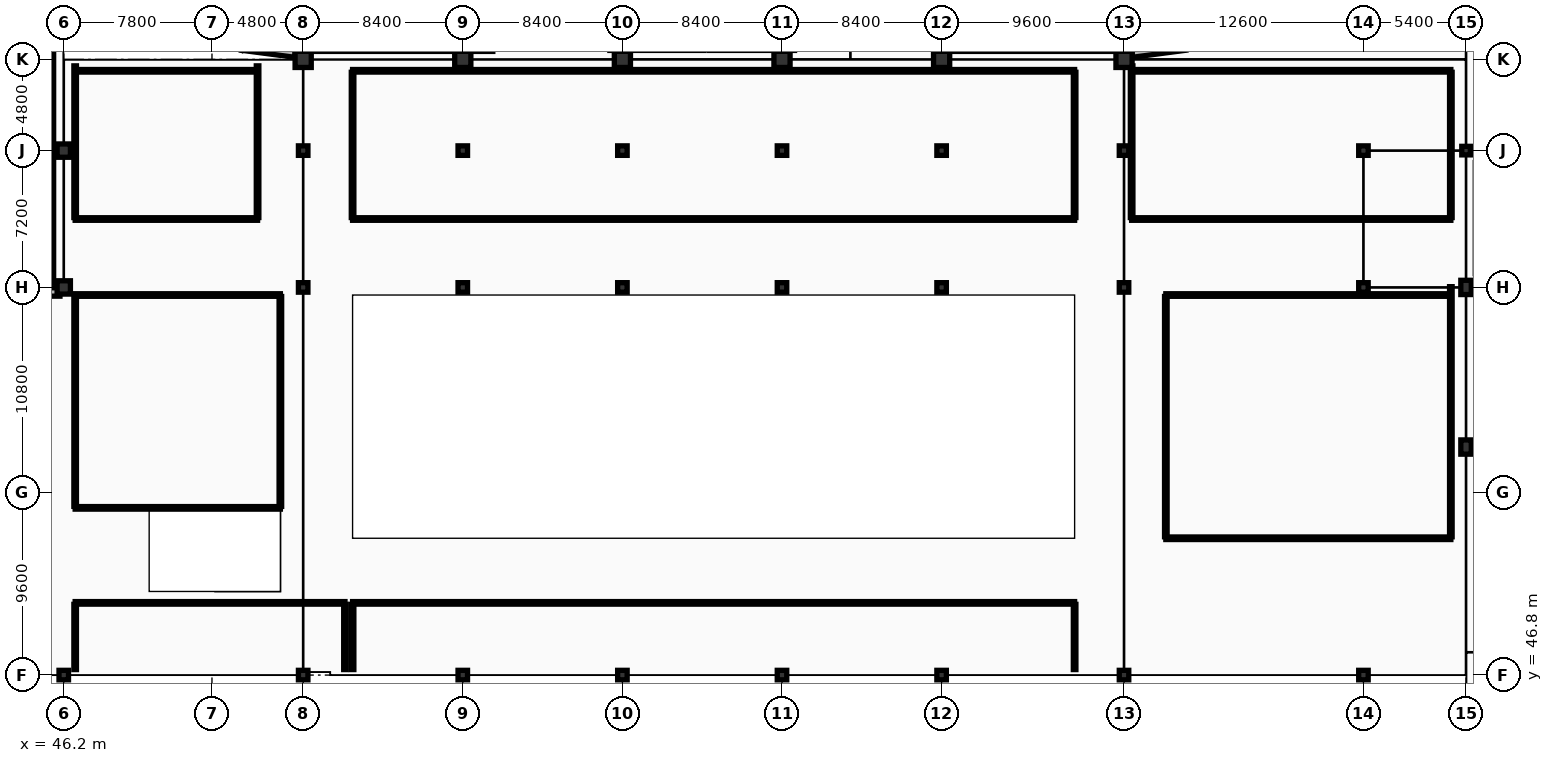
"""IFC4 building model, lengths in metres.
Left out: names, types, materials, properties, quantities, classifications, styles, units other than length and angle.
Written with IfcOpenShell. Run it as: python <this file> out.ifc"""

import sys

from ifc_helpers import new_model, si_unit, direction, frame, frame_2d, origin, origin_2d, place, context, subcontext, project, spatial, rectangle, extrude, element, fill, save


model = new_model("IFC4")
c1 = context("Model", 3, precision=1e-05, world=origin(), true_north=direction((0.0, 1.0)))
c2 = subcontext(c1, "Body", "Model", "MODEL_VIEW")
j1 = project(units=[si_unit("LENGTHUNIT", "METRE"), si_unit("PLANEANGLEUNIT", "RADIAN")], contexts=[c1])
p1 = place(None, origin())
s1 = spatial("IfcSite", under=j1, at=p1, CompositionType="ELEMENT")
p2 = place(p1, origin())
s2 = spatial("IfcBuilding", under=s1, at=p2, CompositionType="ELEMENT")
p3 = place(p2, frame((0.0, 0.0, 5.4)))
s3 = spatial("IfcBuildingStorey", under=s2, at=p3, CompositionType="ELEMENT", Elevation=5.4)
for number, where, z_axis, x_axis in (
    (1, (58.8, 79.2, 0.0), (0.0, 0.0, 1.0), (1.0, 0.0, 0.0)),
    (2, (67.2, 79.2, 0.0), (0.0, 0.0, 1.0), (1.0, 0.0, 0.0)),
    (3, (75.6, 79.2, 0.0), (0.0, 0.0, 1.0), (1.0, 0.0, 0.0)),
    (4, (84.0, 79.2, 0.0), (0.0, 0.0, 1.0), (1.0, 0.0, 0.0)),
    (5, (92.4, 79.2, 0.0), (0.0, 0.0, 1.0), (1.0, 0.0, 0.0)),
    (6, (102.0, 79.2, 0.0), (0.0, 0.0, 1.0), (1.0, 0.0, 0.0)),
):
    element("IfcColumn", number, at=place(p3, frame(where, z_axis=z_axis, x_axis=x_axis)), inside=s3, PredefinedType="COLUMN", context=c2, shape_type="SweptSolid", body=[
        extrude(rectangle(XDim=0.85, YDim=0.85, at=origin_2d()), origin(), (0.0, 0.0, 1.0), 4.5),
    ])
for number, where, z_axis, x_axis in (
    (7, (46.2, 67.2, 0.0), (0.0, 0.0, 1.0), (1.0, 0.0, 0.0)),
    (8, (46.2, 74.4, 0.0), (0.0, 0.0, 1.0), (1.0, 0.0, 0.0)),
):
    element("IfcColumn", number, at=place(p3, frame(where, z_axis=z_axis, x_axis=x_axis)), inside=s3, PredefinedType="COLUMN", context=c2, shape_type="SweptSolid", body=[
        extrude(rectangle(XDim=0.7, YDim=0.7, at=origin_2d()), origin(), (0.0, 0.0, 1.0), 4.5),
    ])
for number, where, z_axis, x_axis in (
    (9, (120.0, 58.8, 0.0), (0.0, 0.0, 1.0), (1.0, 0.0, 0.0)),
    (10, (120.0, 67.2, 0.0), (0.0, 0.0, 1.0), (1.0, 0.0, 0.0)),
):
    element("IfcColumn", number, at=place(p3, frame(where, z_axis=z_axis, x_axis=x_axis)), inside=s3, PredefinedType="COLUMN", context=c2, shape_type="SweptSolid", body=[
        extrude(rectangle(XDim=0.55, YDim=0.75, at=origin_2d()), origin(), (0.0, 0.0, 1.0), 4.5),
    ])
p4 = place(p3, frame((120.0, 74.4, 0.0), z_axis=(0.0, 0.0, 1.0), x_axis=(1.0, 0.0, 0.0)))
e11 = element("IfcColumn", 11, at=p4, inside=s3, PredefinedType="COLUMN", context=c2, shape_type="SweptSolid", body=[
    extrude(rectangle(XDim=0.45, YDim=0.45, at=origin_2d()), origin(), (0.0, 0.0, 1.0), 4.5),
])
for number, where, z_axis, x_axis in (
    (12, (46.2, 46.8, 0.0), (0.0, 0.0, 1.0), (1.0, 0.0, 0.0)),
    (13, (58.8, 46.8, 0.0), (0.0, 0.0, 1.0), (1.0, 0.0, 0.0)),
    (14, (58.8, 67.2, 0.0), (0.0, 0.0, 1.0), (1.0, 0.0, 0.0)),
    (15, (58.8, 74.4, 0.0), (0.0, 0.0, 1.0), (1.0, 0.0, 0.0)),
    (16, (67.2, 46.8, 0.0), (0.0, 0.0, 1.0), (1.0, 0.0, 0.0)),
    (17, (67.2, 67.2, 0.0), (0.0, 0.0, 1.0), (1.0, 0.0, 0.0)),
    (18, (67.2, 74.4, 0.0), (0.0, 0.0, 1.0), (1.0, 0.0, 0.0)),
    (19, (75.6, 46.8, 0.0), (0.0, 0.0, 1.0), (1.0, 0.0, 0.0)),
    (20, (75.6, 67.2, 0.0), (0.0, 0.0, 1.0), (1.0, 0.0, 0.0)),
    (21, (75.6, 74.4, 0.0), (0.0, 0.0, 1.0), (1.0, 0.0, 0.0)),
    (22, (84.0, 46.8, 0.0), (0.0, 0.0, 1.0), (1.0, 0.0, 0.0)),
    (23, (84.0, 67.2, 0.0), (0.0, 0.0, 1.0), (1.0, 0.0, 0.0)),
    (24, (84.0, 74.4, 0.0), (0.0, 0.0, 1.0), (1.0, 0.0, 0.0)),
    (25, (92.4, 46.8, 0.0), (0.0, 0.0, 1.0), (1.0, 0.0, 0.0)),
    (26, (92.4, 67.2, 0.0), (0.0, 0.0, 1.0), (1.0, 0.0, 0.0)),
    (27, (92.4, 74.4, 0.0), (0.0, 0.0, 1.0), (1.0, 0.0, 0.0)),
    (28, (102.0, 46.8, 0.0), (0.0, 0.0, 1.0), (1.0, 0.0, 0.0)),
    (29, (102.0, 67.2, 0.0), (0.0, 0.0, 1.0), (1.0, 0.0, 0.0)),
    (30, (102.0, 74.4, 0.0), (0.0, 0.0, 1.0), (1.0, 0.0, 0.0)),
    (31, (114.6, 46.8, 0.0), (0.0, 0.0, 1.0), (1.0, 0.0, 0.0)),
    (32, (114.6, 67.2, 0.0), (0.0, 0.0, 1.0), (1.0, 0.0, 0.0)),
    (33, (114.6, 74.4, 0.0), (0.0, 0.0, 1.0), (1.0, 0.0, 0.0)),
):
    element("IfcColumn", number, at=place(p3, frame(where, z_axis=z_axis, x_axis=x_axis)), inside=s3, PredefinedType="COLUMN", context=c2, shape_type="SweptSolid", body=[
        extrude(rectangle(XDim=0.5, YDim=0.5, at=origin_2d()), origin(), (0.0, 0.0, 1.0), 4.5),
    ])
p5 = place(p3, frame((55.572, 79.877, 0.0), z_axis=(0.0, 0.0, 1.0), x_axis=(0.991443994311, -0.130532778046, 0.0)))
e34 = element("IfcWall", 34, at=p5, inside=s3, PredefinedType="ELEMENTEDWALL", context=c2, shape_type="SweptSolid", body=[
    extrude(rectangle(XDim=2.824, YDim=0.395, at=frame_2d((1.412, 0.0))), origin(), (0.0, 0.0, 1.0), 3.37),
])
p6 = place(p3, frame((102.428, 79.509, 0.0), z_axis=(0.0, 0.0, 1.0), x_axis=(0.991443994311, 0.130532778046, 0.0)))
e35 = element("IfcWall", 35, at=p6, inside=s3, PredefinedType="ELEMENTEDWALL", context=c2, shape_type="SweptSolid", body=[
    extrude(rectangle(XDim=2.824, YDim=0.395, at=frame_2d((1.412, 0.0))), origin(), (0.0, 0.0, 1.0), 3.37),
])
p7 = place(p6, frame((0.962, 0.0, 0.85)))
e36 = element("IfcOpeningElement", 36, at=p7, cuts=e35, PredefinedType="OPENING", context=c2, shape_type="SweptSolid", body=[
    extrude(rectangle(XDim=0.9, YDim=1.85, at=frame_2d((0.45, 0.925))), frame((0.0, 0.208, 0.0), z_axis=(0.0, -1.0, 0.0), x_axis=(1.0, 0.0, 0.0)), (0.0, 0.0, 1.0), 0.415),
])
p8 = place(p3, frame((38.45, 66.96, 0.0), z_axis=(0.0, 0.0, 1.0), x_axis=(1.0, 0.0, 0.0)))
e37 = element("IfcWall", 37, at=p8, inside=s3, PredefinedType="STANDARD", context=c2, shape_type="SweptSolid", body=[
    extrude(rectangle(XDim=7.55, YDim=0.44, at=frame_2d((3.775, 0.0))), origin(), (0.0, 0.0, 1.0), 3.23),
])
p9 = place(p3, frame((45.6, 67.8, 0.0), z_axis=(0.0, 0.0, 1.0), x_axis=(-1.0, 0.0, 0.0)))
e38 = element("IfcWall", 38, at=p9, inside=s3, PredefinedType="PARTITIONING", context=c2, shape_type="SweptSolid", body=[
    extrude(rectangle(XDim=21.8, YDim=0.135, at=frame_2d((10.9, 0.0))), origin(), (0.0, 0.0, 1.0), 3.68),
])
p10 = place(p3, frame((45.6, 85.522, 0.0), z_axis=(0.0, 0.0, 1.0), x_axis=(0.0, -1.0, 0.0)))
e39 = element("IfcWall", 39, at=p10, inside=s3, PredefinedType="PARTITIONING", context=c2, shape_type="SweptSolid", body=[
    extrude(rectangle(XDim=18.103, YDim=0.135, at=frame_2d((9.051, 0.0))), origin(), (0.0, 0.0, 1.0), 3.57),
])
p11 = place(p3, frame((46.8, 50.6, 0.0), z_axis=(0.0, 0.0, 1.0), x_axis=(1.0, 0.0, 0.0)))
e40 = element("IfcWall", 40, at=p11, inside=s3, PredefinedType="PARTITIONING", context=c2, shape_type="SweptSolid", body=[
    extrude(rectangle(XDim=14.2, YDim=0.135, at=frame_2d((7.1, 0.0))), origin(), (0.0, 0.0, 1.0), 3.23),
])
p12 = place(p11, frame((2.232, 0.0, 0.0)))
e41 = element("IfcOpeningElement", 41, at=p12, cuts=e40, PredefinedType="OPENING", context=c2, shape_type="SweptSolid", body=[
    extrude(rectangle(XDim=0.95, YDim=2.15, at=frame_2d((0.475, 1.075))), frame((0.0, 0.077, 0.0), z_axis=(0.0, -1.0, 0.0), x_axis=(1.0, 0.0, 0.0)), (0.0, 0.0, 1.0), 0.155),
])
p13 = place(p3, frame((46.8, 47.09, 0.0), z_axis=(0.0, 0.0, 1.0), x_axis=(0.0, 1.0, 0.0)))
e42 = element("IfcWall", 42, at=p13, inside=s3, PredefinedType="PARTITIONING", context=c2, shape_type="SweptSolid", body=[
    extrude(rectangle(XDim=3.432, YDim=0.135, at=frame_2d((1.716, 0.0))), origin(), (0.0, 0.0, 1.0), 3.33),
])
p14 = place(p3, frame((61.0, 50.522, 0.0), z_axis=(0.0, 0.0, 1.0), x_axis=(0.0, -1.0, 0.0)))
e43 = element("IfcWall", 43, at=p14, inside=s3, PredefinedType="PARTITIONING", context=c2, shape_type="SweptSolid", body=[
    extrude(rectangle(XDim=3.432, YDim=0.135, at=frame_2d((1.716, 0.0))), origin(), (0.0, 0.0, 1.0), 3.53),
])
p15 = place(p3, frame((61.4, 50.6, 0.0), z_axis=(0.0, 0.0, 1.0), x_axis=(1.0, 0.0, 0.0)))
e44 = element("IfcWall", 44, at=p15, inside=s3, PredefinedType="PARTITIONING", context=c2, shape_type="SweptSolid", body=[
    extrude(rectangle(XDim=38.0, YDim=0.135, at=frame_2d((19.0, 0.0))), origin(), (0.0, 0.0, 1.0), 4.225),
])
p16 = place(p15, frame((2.167, 0.0, 0.0)))
e45 = element("IfcOpeningElement", 45, at=p16, cuts=e44, PredefinedType="OPENING", context=c2, shape_type="SweptSolid", body=[
    extrude(rectangle(XDim=0.95, YDim=2.15, at=frame_2d((0.475, 1.075))), frame((0.0, 0.077, 0.0), z_axis=(0.0, -1.0, 0.0), x_axis=(1.0, 0.0, 0.0)), (0.0, 0.0, 1.0), 0.155),
])
p17 = place(p3, frame((61.4, 47.09, 0.0), z_axis=(0.0, 0.0, 1.0), x_axis=(0.0, 1.0, 0.0)))
e46 = element("IfcWall", 46, at=p17, inside=s3, PredefinedType="PARTITIONING", context=c2, shape_type="SweptSolid", body=[
    extrude(rectangle(XDim=3.432, YDim=0.135, at=frame_2d((1.716, 0.0))), origin(), (0.0, 0.0, 1.0), 3.53),
])
p18 = place(p3, frame((99.4, 50.522, 0.0), z_axis=(0.0, 0.0, 1.0), x_axis=(0.0, -1.0, 0.0)))
e47 = element("IfcWall", 47, at=p18, inside=s3, PredefinedType="PARTITIONING", context=c2, shape_type="SweptSolid", body=[
    extrude(rectangle(XDim=3.432, YDim=0.135, at=frame_2d((1.716, 0.0))), origin(), (0.0, 0.0, 1.0), 3.43),
])
p19 = place(p3, frame((46.8, 78.6, 0.0), z_axis=(0.0, 0.0, 1.0), x_axis=(1.0, 0.0, 0.0)))
e48 = element("IfcWall", 48, at=p19, inside=s3, PredefinedType="PARTITIONING", context=c2, shape_type="SweptSolid", body=[
    extrude(rectangle(XDim=9.6, YDim=0.135, at=frame_2d((4.8, 0.0))), origin(), (0.0, 0.0, 1.0), 4.225),
])
p20 = place(p3, frame((56.4, 70.8, 0.0), z_axis=(0.0, 0.0, 1.0), x_axis=(-1.0, 0.0, 0.0)))
e49 = element("IfcWall", 49, at=p20, inside=s3, PredefinedType="PARTITIONING", context=c2, shape_type="SweptSolid", body=[
    extrude(rectangle(XDim=9.6, YDim=0.135, at=frame_2d((4.8, 0.0))), origin(), (0.0, 0.0, 1.0), 3.63),
])
p21 = place(p20, frame((1.94, 0.0, 0.0)))
e50 = element("IfcOpeningElement", 50, at=p21, cuts=e49, PredefinedType="OPENING", context=c2, shape_type="SweptSolid", body=[
    extrude(rectangle(XDim=0.95, YDim=2.15, at=frame_2d((0.475, 1.075))), frame((0.0, 0.077, 0.0), z_axis=(0.0, -1.0, 0.0), x_axis=(1.0, 0.0, 0.0)), (0.0, 0.0, 1.0), 0.155),
])
for number, where, z_axis, x_axis in (
    (51, (46.8, 70.877, 0.0), (0.0, 0.0, 1.0), (0.0, 1.0, 0.0)),
    (52, (56.4, 78.86, 0.0), (0.0, 0.0, 1.0), (0.0, -1.0, 0.0)),
):
    element("IfcWall", number, at=place(p3, frame(where, z_axis=z_axis, x_axis=x_axis)), inside=s3, PredefinedType="PARTITIONING", context=c2, shape_type="SweptSolid", body=[
        extrude(rectangle(XDim=7.983, YDim=0.135, at=frame_2d((3.991, 0.0))), origin(), (0.0, 0.0, 1.0), 3.33),
    ])
p22 = place(p3, frame((61.4, 78.6, 0.0), z_axis=(0.0, 0.0, 1.0), x_axis=(1.0, 0.0, 0.0)))
e53 = element("IfcWall", 53, at=p22, inside=s3, PredefinedType="PARTITIONING", context=c2, shape_type="SweptSolid", body=[
    extrude(rectangle(XDim=38.0, YDim=0.135, at=frame_2d((19.0, 0.0))), origin(), (0.0, 0.0, 1.0), 3.68),
])
p23 = place(p3, frame((99.4, 70.8, 0.0), z_axis=(0.0, 0.0, 1.0), x_axis=(-1.0, 0.0, 0.0)))
e54 = element("IfcWall", 54, at=p23, inside=s3, PredefinedType="PARTITIONING", context=c2, shape_type="SweptSolid", body=[
    extrude(rectangle(XDim=38.0, YDim=0.135, at=frame_2d((19.0, 0.0))), origin(), (0.0, 0.0, 1.0), 3.63),
])
p24 = place(p23, frame((2.167, 0.0, 0.0)))
e55 = element("IfcOpeningElement", 55, at=p24, cuts=e54, PredefinedType="OPENING", context=c2, shape_type="SweptSolid", body=[
    extrude(rectangle(XDim=0.95, YDim=2.15, at=frame_2d((0.475, 1.075))), frame((0.0, 0.077, 0.0), z_axis=(0.0, -1.0, 0.0), x_axis=(1.0, 0.0, 0.0)), (0.0, 0.0, 1.0), 0.155),
])
p25 = place(p3, frame((61.4, 70.877, 0.0), z_axis=(0.0, 0.0, 1.0), x_axis=(0.0, 1.0, 0.0)))
e56 = element("IfcWall", 56, at=p25, inside=s3, PredefinedType="PARTITIONING", context=c2, shape_type="SweptSolid", body=[
    extrude(rectangle(XDim=7.645, YDim=0.135, at=frame_2d((3.823, 0.0))), origin(), (0.0, 0.0, 1.0), 3.53),
])
p26 = place(p3, frame((99.4, 78.522, 0.0), z_axis=(0.0, 0.0, 1.0), x_axis=(0.0, -1.0, 0.0)))
e57 = element("IfcWall", 57, at=p26, inside=s3, PredefinedType="PARTITIONING", context=c2, shape_type="SweptSolid", body=[
    extrude(rectangle(XDim=7.645, YDim=0.135, at=frame_2d((3.823, 0.0))), origin(), (0.0, 0.0, 1.0), 3.43),
])
p27 = place(p3, frame((46.8, 66.8, 0.0), z_axis=(0.0, 0.0, 1.0), x_axis=(1.0, 0.0, 0.0)))
e58 = element("IfcWall", 58, at=p27, inside=s3, PredefinedType="PARTITIONING", context=c2, shape_type="SweptSolid", body=[
    extrude(rectangle(XDim=10.8, YDim=0.135, at=frame_2d((5.4, 0.0))), origin(), (0.0, 0.0, 1.0), 3.33),
])
p28 = place(p3, frame((57.6, 55.6, 0.0), z_axis=(0.0, 0.0, 1.0), x_axis=(-1.0, 0.0, 0.0)))
e59 = element("IfcWall", 59, at=p28, inside=s3, PredefinedType="PARTITIONING", context=c2, shape_type="SweptSolid", body=[
    extrude(rectangle(XDim=10.8, YDim=0.135, at=frame_2d((5.4, 0.0))), origin(), (0.0, 0.0, 1.0), 4.225),
])
p29 = place(p3, frame((46.8, 55.677, 0.0), z_axis=(0.0, 0.0, 1.0), x_axis=(0.0, 1.0, 0.0)))
e60 = element("IfcWall", 60, at=p29, inside=s3, PredefinedType="PARTITIONING", context=c2, shape_type="SweptSolid", body=[
    extrude(rectangle(XDim=11.045, YDim=0.135, at=frame_2d((5.522, 0.0))), origin(), (0.0, 0.0, 1.0), 3.33),
])
p30 = place(p3, frame((57.6, 66.722, 0.0), z_axis=(0.0, 0.0, 1.0), x_axis=(0.0, -1.0, 0.0)))
e61 = element("IfcWall", 61, at=p30, inside=s3, PredefinedType="PARTITIONING", context=c2, shape_type="SweptSolid", body=[
    extrude(rectangle(XDim=11.045, YDim=0.135, at=frame_2d((5.522, 0.0))), origin(), (0.0, 0.0, 1.0), 3.33),
])
p31 = place(p30, frame((2.215, 0.0, 0.0)))
e62 = element("IfcOpeningElement", 62, at=p31, cuts=e61, PredefinedType="OPENING", context=c2, shape_type="SweptSolid", body=[
    extrude(rectangle(XDim=1.02, YDim=2.15, at=frame_2d((0.51, 1.075))), frame((0.0, 0.077, 0.0), z_axis=(0.0, -1.0, 0.0), x_axis=(1.0, 0.0, 0.0)), (0.0, 0.0, 1.0), 0.155),
])
for number, where, z_axis, x_axis in (
    (63, (104.2, 66.8, 0.0), (0.0, 0.0, 1.0), (1.0, 0.0, 0.0)),
    (64, (119.2, 54.0, 0.0), (0.0, 0.0, 1.0), (-1.0, 0.0, 0.0)),
):
    element("IfcWall", number, at=place(p3, frame(where, z_axis=z_axis, x_axis=x_axis)), inside=s3, PredefinedType="PARTITIONING", context=c2, shape_type="SweptSolid", body=[
        extrude(rectangle(XDim=15.0, YDim=0.135, at=frame_2d((7.5, 0.0))), origin(), (0.0, 0.0, 1.0), 3.23),
    ])
p32 = place(p3, frame((104.2, 54.077, 0.0), z_axis=(0.0, 0.0, 1.0), x_axis=(0.0, 1.0, 0.0)))
e65 = element("IfcWall", 65, at=p32, inside=s3, PredefinedType="PARTITIONING", context=c2, shape_type="SweptSolid", body=[
    extrude(rectangle(XDim=12.645, YDim=0.135, at=frame_2d((6.323, 0.0))), origin(), (0.0, 0.0, 1.0), 3.33),
])
p33 = place(p32, frame((1.999, 0.0, 0.0)))
e66 = element("IfcOpeningElement", 66, at=p33, cuts=e65, PredefinedType="OPENING", context=c2, shape_type="SweptSolid", body=[
    extrude(rectangle(XDim=0.95, YDim=2.15, at=frame_2d((0.475, 1.075))), frame((0.0, 0.077, 0.0), z_axis=(0.0, -1.0, 0.0), x_axis=(1.0, 0.0, 0.0)), (0.0, 0.0, 1.0), 0.155),
])
p34 = place(p3, frame((119.2, 67.24, 0.0), z_axis=(0.0, 0.0, 1.0), x_axis=(0.0, -1.0, 0.0)))
e67 = element("IfcWall", 67, at=p34, inside=s3, PredefinedType="PARTITIONING", context=c2, shape_type="SweptSolid", body=[
    extrude(rectangle(XDim=13.163, YDim=0.135, at=frame_2d((6.581, 0.0))), origin(), (0.0, 0.0, 1.0), 3.53),
])
p35 = place(p3, frame((102.4, 78.6, 0.0), z_axis=(0.0, 0.0, 1.0), x_axis=(1.0, 0.0, 0.0)))
e68 = element("IfcWall", 68, at=p35, inside=s3, PredefinedType="PARTITIONING", context=c2, shape_type="SweptSolid", body=[
    extrude(rectangle(XDim=16.8, YDim=0.135, at=frame_2d((8.4, 0.0))), origin(), (0.0, 0.0, 1.0), 3.27),
])
p36 = place(p3, frame((119.2, 70.8, 0.0), z_axis=(0.0, 0.0, 1.0), x_axis=(-1.0, 0.0, 0.0)))
e69 = element("IfcWall", 69, at=p36, inside=s3, PredefinedType="PARTITIONING", context=c2, shape_type="SweptSolid", body=[
    extrude(rectangle(XDim=16.8, YDim=0.135, at=frame_2d((8.4, 0.0))), origin(), (0.0, 0.0, 1.0), 3.63),
])
p37 = place(p36, frame((2.623, 0.0, 0.0)))
e70 = element("IfcOpeningElement", 70, at=p37, cuts=e69, PredefinedType="OPENING", context=c2, shape_type="SweptSolid", body=[
    extrude(rectangle(XDim=0.95, YDim=2.15, at=frame_2d((0.475, 1.075))), frame((0.0, 0.077, 0.0), z_axis=(0.0, -1.0, 0.0), x_axis=(1.0, 0.0, 0.0)), (0.0, 0.0, 1.0), 0.155),
])
p38 = place(p3, frame((102.4, 70.877, 0.0), z_axis=(0.0, 0.0, 1.0), x_axis=(0.0, 1.0, 0.0)))
e71 = element("IfcWall", 71, at=p38, inside=s3, PredefinedType="PARTITIONING", context=c2, shape_type="SweptSolid", body=[
    extrude(rectangle(XDim=7.983, YDim=0.135, at=frame_2d((3.991, 0.0))), origin(), (0.0, 0.0, 1.0), 3.33),
])
p39 = place(p3, frame((119.2, 78.522, 0.0), z_axis=(0.0, 0.0, 1.0), x_axis=(0.0, -1.0, 0.0)))
e72 = element("IfcWall", 72, at=p39, inside=s3, PredefinedType="PARTITIONING", context=c2, shape_type="SweptSolid", body=[
    extrude(rectangle(XDim=7.645, YDim=0.135, at=frame_2d((3.823, 0.0))), origin(), (0.0, 0.0, 1.0), 3.53),
])
p40 = place(p12, origin())
e73 = element("IfcDoor", 73, at=p40, inside=s3, OperationType="SINGLE_SWING_LEFT", PredefinedType="DOOR", context=c2, shape_type="SweptSolid", body=[
    extrude(rectangle(XDim=0.95, YDim=2.15, at=frame_2d((0.475, 1.075))), frame((0.0, 0.025, 0.0), z_axis=(0.0, -1.0, 0.0), x_axis=(1.0, 0.0, 0.0)), (0.0, 0.0, 1.0), 0.05),
])
fill(e41, e73)
p41 = place(p16, origin())
e74 = element("IfcDoor", 74, at=p41, inside=s3, OperationType="SINGLE_SWING_RIGHT", PredefinedType="DOOR", context=c2, shape_type="SweptSolid", body=[
    extrude(rectangle(XDim=0.95, YDim=2.15, at=frame_2d((0.475, 1.075))), frame((0.0, 0.025, 0.0), z_axis=(0.0, -1.0, 0.0), x_axis=(1.0, 0.0, 0.0)), (0.0, 0.0, 1.0), 0.05),
])
fill(e45, e74)
p42 = place(p21, origin())
e75 = element("IfcDoor", 75, at=p42, inside=s3, OperationType="SINGLE_SWING_LEFT", PredefinedType="DOOR", context=c2, shape_type="SweptSolid", body=[
    extrude(rectangle(XDim=0.95, YDim=2.15, at=frame_2d((0.475, 1.075))), frame((0.0, 0.025, 0.0), z_axis=(0.0, -1.0, 0.0), x_axis=(1.0, 0.0, 0.0)), (0.0, 0.0, 1.0), 0.05),
])
fill(e50, e75)
p43 = place(p24, origin())
e76 = element("IfcDoor", 76, at=p43, inside=s3, OperationType="SINGLE_SWING_RIGHT", PredefinedType="DOOR", context=c2, shape_type="SweptSolid", body=[
    extrude(rectangle(XDim=0.95, YDim=2.15, at=frame_2d((0.475, 1.075))), frame((0.0, 0.025, 0.0), z_axis=(0.0, -1.0, 0.0), x_axis=(1.0, 0.0, 0.0)), (0.0, 0.0, 1.0), 0.05),
])
fill(e55, e76)
p44 = place(p31, origin())
e77 = element("IfcDoor", 77, at=p44, inside=s3, OperationType="SINGLE_SWING_LEFT", PredefinedType="DOOR", context=c2, shape_type="SweptSolid", body=[
    extrude(rectangle(XDim=1.02, YDim=2.15, at=frame_2d((0.51, 1.075))), frame((0.0, 0.025, 0.0), z_axis=(0.0, -1.0, 0.0), x_axis=(1.0, 0.0, 0.0)), (0.0, 0.0, 1.0), 0.05),
])
fill(e62, e77)
p45 = place(p33, origin())
e78 = element("IfcDoor", 78, at=p45, inside=s3, OperationType="SINGLE_SWING_RIGHT", PredefinedType="DOOR", context=c2, shape_type="SweptSolid", body=[
    extrude(rectangle(XDim=0.95, YDim=2.15, at=frame_2d((0.475, 1.075))), frame((0.0, 0.025, 0.0), z_axis=(0.0, -1.0, 0.0), x_axis=(1.0, 0.0, 0.0)), (0.0, 0.0, 1.0), 0.05),
])
fill(e66, e78)
p46 = place(p37, origin())
e79 = element("IfcDoor", 79, at=p46, inside=s3, OperationType="SINGLE_SWING_LEFT", PredefinedType="DOOR", context=c2, shape_type="SweptSolid", body=[
    extrude(rectangle(XDim=0.95, YDim=2.15, at=frame_2d((0.475, 1.075))), frame((0.0, 0.025, 0.0), z_axis=(0.0, -1.0, 0.0), x_axis=(1.0, 0.0, 0.0)), (0.0, 0.0, 1.0), 0.05),
])
fill(e70, e79)
save(model, sys.argv[1])
